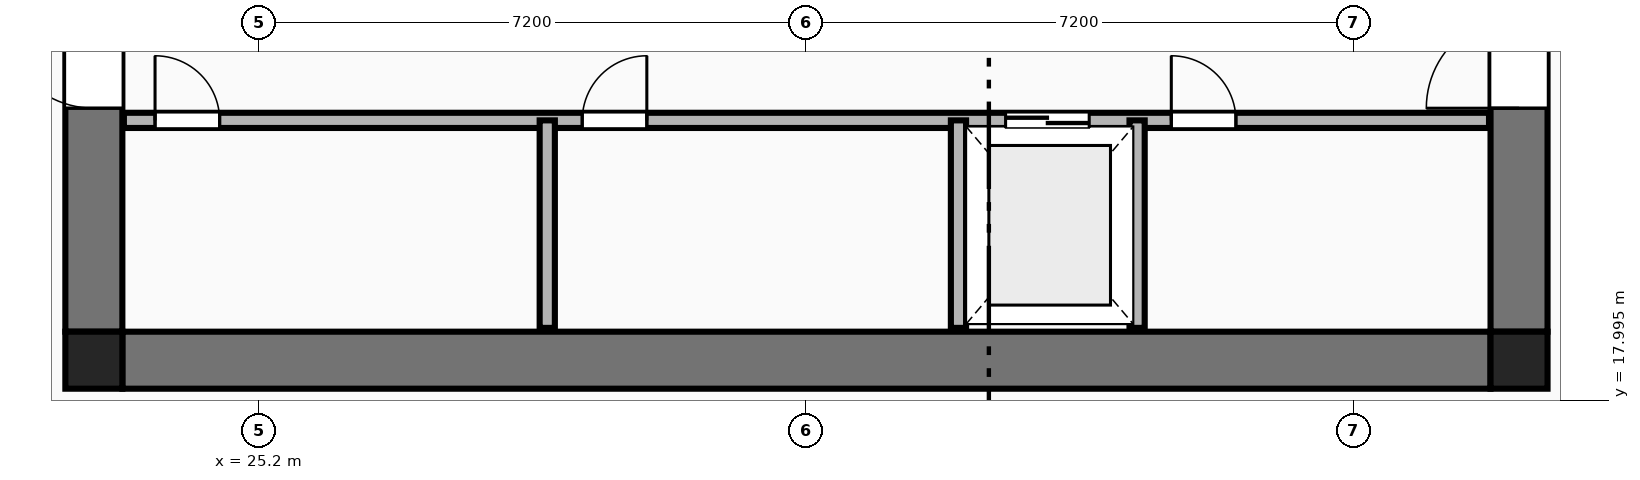
"""IFC4 building model, lengths in metres.
Left out: names, types, materials, properties, quantities, classifications, styles, units other than length and angle.
Written with IfcOpenShell. Run it as: python <this file> out.ifc"""

import sys

from ifc_helpers import new_model, si_unit, direction, frame, frame_2d, origin, origin_2d, place, context, subcontext, project, spatial, rectangle, extrude, element, fill, save


model = new_model("IFC4")
c1 = context("Model", 3, precision=1e-05, world=origin(), true_north=direction((0.0, 1.0)))
c2 = subcontext(c1, "Body", "Model", "MODEL_VIEW")
j1 = project(units=[si_unit("LENGTHUNIT", "METRE"), si_unit("PLANEANGLEUNIT", "RADIAN")], contexts=[c1])
p1 = place(None, origin())
s1 = spatial("IfcSite", under=j1, at=p1, CompositionType="ELEMENT")
p2 = place(p1, origin())
s2 = spatial("IfcBuilding", under=s1, at=p2, CompositionType="ELEMENT")
p3 = place(p2, frame((0.0, 0.0, 126.8)))
s3 = spatial("IfcBuildingStorey", under=s2, at=p3, CompositionType="ELEMENT", Elevation=126.8)
for number, where, z_axis, x_axis in (
    (1, (23.025, 18.525, 0.0), (0.0, 0.0, 1.0), (1.0, 0.0, 0.0)),
    (2, (41.775, 18.525, 0.0), (0.0, 0.0, 1.0), (1.0, 0.0, 0.0)),
):
    element("IfcColumn", number, at=place(p3, frame(where, z_axis=z_axis, x_axis=x_axis)), inside=s3, PredefinedType="COLUMN", context=c2, shape_type="SweptSolid", body=[
        extrude(rectangle(XDim=0.75, YDim=0.75, at=origin_2d()), origin(), (0.0, 0.0, 1.0), 3.55),
    ])
p4 = place(p3, frame((23.4, 18.525, 0.0), z_axis=(0.0, 0.0, 1.0), x_axis=(1.0, 0.0, 0.0)))
e3 = element("IfcWall", 3, at=p4, inside=s3, PredefinedType="SHEAR", context=c2, shape_type="SweptSolid", body=[
    extrude(rectangle(XDim=18.0, YDim=0.75, at=frame_2d((9.0, 0.0))), origin(), (0.0, 0.0, 1.0), 3.34),
])
p5 = place(p3, frame((23.025, 18.9, 0.0), z_axis=(0.0, 0.0, 1.0), x_axis=(0.0, 1.0, 0.0)))
e4 = element("IfcWall", 4, at=p5, inside=s3, PredefinedType="SHEAR", context=c2, shape_type="SweptSolid", body=[
    extrude(rectangle(XDim=14.0, YDim=0.75, at=frame_2d((7.0, 0.0))), origin(), (0.0, 0.0, 1.0), 3.34),
])
p6 = place(p5, frame((2.94, 0.0, 0.0)))
e5 = element("IfcOpeningElement", 5, at=p6, cuts=e4, PredefinedType="OPENING", context=c2, shape_type="SweptSolid", body=[
    extrude(rectangle(XDim=1.22, YDim=2.25, at=frame_2d((0.61, 1.125))), frame((0.0, 0.385, 0.0), z_axis=(0.0, -1.0, 0.0), x_axis=(1.0, 0.0, 0.0)), (0.0, 0.0, 1.0), 0.77),
])
p7 = place(p3, frame((41.775, 18.9, 0.0), z_axis=(0.0, 0.0, 1.0), x_axis=(0.0, 1.0, 0.0)))
e6 = element("IfcWall", 6, at=p7, inside=s3, PredefinedType="SHEAR", context=c2, shape_type="SweptSolid", body=[
    extrude(rectangle(XDim=14.0, YDim=0.75, at=frame_2d((7.0, 0.0))), origin(), (0.0, 0.0, 1.0), 3.34),
])
p8 = place(p7, frame((2.94, 0.0, 0.0)))
e7 = element("IfcOpeningElement", 7, at=p8, cuts=e6, PredefinedType="OPENING", context=c2, shape_type="SweptSolid", body=[
    extrude(rectangle(XDim=1.22, YDim=2.25, at=frame_2d((0.61, 1.125))), frame((0.0, 0.385, 0.0), z_axis=(0.0, -1.0, 0.0), x_axis=(1.0, 0.0, 0.0)), (0.0, 0.0, 1.0), 0.77),
])
p9 = place(p3, frame((23.42, 21.68, 0.0), z_axis=(0.0, 0.0, 1.0), x_axis=(1.0, 0.0, 0.0)))
e8 = element("IfcWall", 8, at=p9, inside=s3, PredefinedType="PLUMBINGWALL", context=c2, shape_type="SweptSolid", body=[
    extrude(rectangle(XDim=17.96, YDim=0.2, at=frame_2d((8.98, 0.0))), origin(), (0.0, 0.0, 1.0), 3.34),
])
p10 = place(p9, frame((11.6, 0.0, 0.0)))
e9 = element("IfcOpeningElement", 9, at=p10, cuts=e8, PredefinedType="OPENING", context=c2, shape_type="SweptSolid", body=[
    extrude(rectangle(XDim=1.1, YDim=2.2, at=frame_2d((0.55, 1.1))), frame((0.0, 0.11, 0.0), z_axis=(0.0, -1.0, 0.0), x_axis=(1.0, 0.0, 0.0)), (0.0, 0.0, 1.0), 0.22),
])
p11 = place(p9, frame((0.41, 0.0, 0.0)))
e10 = element("IfcOpeningElement", 10, at=p11, cuts=e8, PredefinedType="OPENING", context=c2, shape_type="SweptSolid", body=[
    extrude(rectangle(XDim=0.85, YDim=2.05, at=frame_2d((0.425, 1.025))), frame((0.0, 0.11, 0.0), z_axis=(0.0, -1.0, 0.0), x_axis=(1.0, 0.0, 0.0)), (0.0, 0.0, 1.0), 0.22),
])
p12 = place(p9, frame((6.03, 0.0, 0.0)))
e11 = element("IfcOpeningElement", 11, at=p12, cuts=e8, PredefinedType="OPENING", context=c2, shape_type="SweptSolid", body=[
    extrude(rectangle(XDim=0.85, YDim=2.05, at=frame_2d((0.425, 1.025))), frame((0.0, 0.11, 0.0), z_axis=(0.0, -1.0, 0.0), x_axis=(1.0, 0.0, 0.0)), (0.0, 0.0, 1.0), 0.22),
])
p13 = place(p9, frame((13.78, 0.0, 0.0)))
e12 = element("IfcOpeningElement", 12, at=p13, cuts=e8, PredefinedType="OPENING", context=c2, shape_type="SweptSolid", body=[
    extrude(rectangle(XDim=0.85, YDim=2.05, at=frame_2d((0.425, 1.025))), frame((0.0, 0.11, 0.0), z_axis=(0.0, -1.0, 0.0), x_axis=(1.0, 0.0, 0.0)), (0.0, 0.0, 1.0), 0.22),
])
for number, where, z_axis, x_axis in (
    (13, (34.4, 18.95, 0.0), (0.0, 0.0, 1.0), (0.0, 1.0, 0.0)),
    (14, (36.75, 18.95, 0.0), (0.0, 0.0, 1.0), (0.0, 1.0, 0.0)),
    (15, (28.99, 18.95, 0.0), (0.0, 0.0, 1.0), (0.0, 1.0, 0.0)),
):
    element("IfcWall", number, at=place(p3, frame(where, z_axis=z_axis, x_axis=x_axis)), inside=s3, PredefinedType="PLUMBINGWALL", context=c2, shape_type="SweptSolid", body=[
        extrude(rectangle(XDim=2.73, YDim=0.2, at=frame_2d((1.365, 0.0))), origin(), (0.0, 0.0, 1.0), 3.34),
    ])
p14 = place(p6, origin())
e16 = element("IfcDoor", 16, at=p14, inside=s3, OperationType="SINGLE_SWING_RIGHT", PredefinedType="DOOR", context=c2, shape_type="SweptSolid", body=[
    extrude(rectangle(XDim=1.22, YDim=2.25, at=frame_2d((0.61, 1.125))), frame((0.0, 0.025, 0.0), z_axis=(0.0, -1.0, 0.0), x_axis=(1.0, 0.0, 0.0)), (0.0, 0.0, 1.0), 0.05),
])
fill(e5, e16)
p15 = place(p8, origin())
e17 = element("IfcDoor", 17, at=p15, inside=s3, OperationType="SINGLE_SWING_LEFT", PredefinedType="DOOR", context=c2, shape_type="SweptSolid", body=[
    extrude(rectangle(XDim=1.22, YDim=2.25, at=frame_2d((0.61, 1.125))), frame((0.0, 0.025, 0.0), z_axis=(0.0, -1.0, 0.0), x_axis=(1.0, 0.0, 0.0)), (0.0, 0.0, 1.0), 0.05),
])
fill(e7, e17)
p16 = place(p10, origin())
e18 = element("IfcDoor", 18, at=p16, inside=s3, OperationType="DOUBLE_DOOR_SLIDING", PredefinedType="DOOR", context=c2, shape_type="SweptSolid", body=[
    extrude(rectangle(XDim=1.1, YDim=2.2, at=frame_2d((0.55, 1.1))), frame((0.0, 0.025, 0.0), z_axis=(0.0, -1.0, 0.0), x_axis=(1.0, 0.0, 0.0)), (0.0, 0.0, 1.0), 0.05),
])
fill(e9, e18)
p17 = place(p11, origin())
e19 = element("IfcDoor", 19, at=p17, inside=s3, OperationType="SINGLE_SWING_LEFT", PredefinedType="DOOR", context=c2, shape_type="SweptSolid", body=[
    extrude(rectangle(XDim=0.85, YDim=2.05, at=frame_2d((0.425, 1.025))), frame((0.0, 0.025, 0.0), z_axis=(0.0, -1.0, 0.0), x_axis=(1.0, 0.0, 0.0)), (0.0, 0.0, 1.0), 0.05),
])
fill(e10, e19)
p18 = place(p12, origin())
e20 = element("IfcDoor", 20, at=p18, inside=s3, OperationType="SINGLE_SWING_RIGHT", PredefinedType="DOOR", context=c2, shape_type="SweptSolid", body=[
    extrude(rectangle(XDim=0.85, YDim=2.05, at=frame_2d((0.425, 1.025))), frame((0.0, 0.025, 0.0), z_axis=(0.0, -1.0, 0.0), x_axis=(1.0, 0.0, 0.0)), (0.0, 0.0, 1.0), 0.05),
])
fill(e11, e20)
p19 = place(p13, origin())
e21 = element("IfcDoor", 21, at=p19, inside=s3, OperationType="SINGLE_SWING_LEFT", PredefinedType="DOOR", context=c2, shape_type="SweptSolid", body=[
    extrude(rectangle(XDim=0.85, YDim=2.05, at=frame_2d((0.425, 1.025))), frame((0.0, 0.025, 0.0), z_axis=(0.0, -1.0, 0.0), x_axis=(1.0, 0.0, 0.0)), (0.0, 0.0, 1.0), 0.05),
])
fill(e12, e21)
save(model, sys.argv[1])
